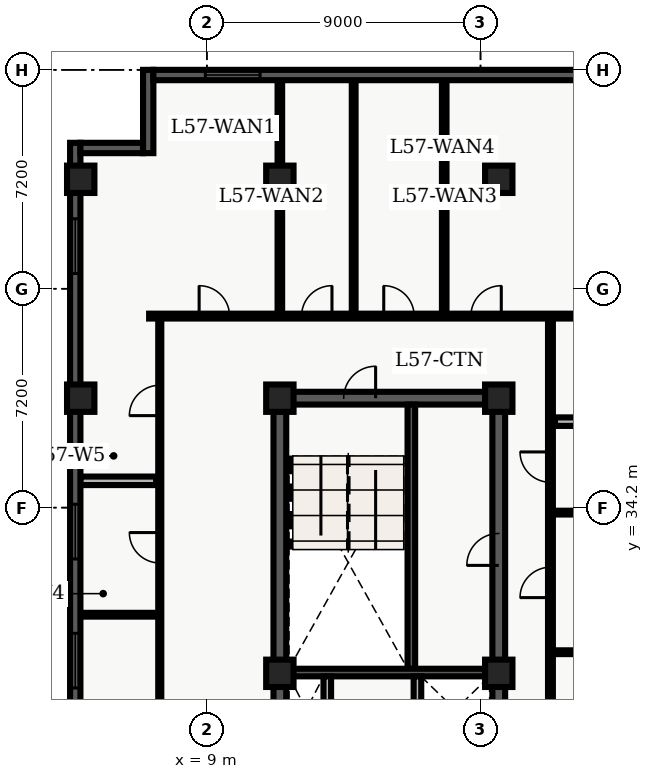
"""IFC4 building model, lengths in metres.
Left out: names, types, materials, properties, quantities, classifications, styles, units other than length and angle.
Written with IfcOpenShell. Run it as: python <this file> out.ifc"""

import sys

from ifc_helpers import new_model, entity, si_unit, converted_unit, direction, frame, origin_with_axes, origin_2d_with_axis, place, context, subcontext, project, spatial, polyline, rectangle, outline, extrude, element, fill, save


model = new_model("IFC4")
c1 = context("Model", 3, precision=1e-05, world=origin_with_axes(), true_north=direction((0.0, 1.0)))
c2 = subcontext(c1, "Body", "Model", "MODEL_VIEW")
j1 = project(units=[si_unit("LENGTHUNIT", "METRE"), converted_unit("PLANEANGLEUNIT", "DEGREE", entity("IfcPlaneAngleMeasure", 0.017), si_unit("PLANEANGLEUNIT", "RADIAN"), dimensions=[0, 0, 0, 0, 0, 0, 0])], contexts=[c1])
p1 = place(None, origin_with_axes())
s1 = spatial("IfcSite", under=j1, at=p1, CompositionType="ELEMENT")
p2 = place(p1, origin_with_axes())
s2 = spatial("IfcBuilding", under=s1, at=p2, CompositionType="ELEMENT")
p3 = place(p2, frame((0.0, 0.0, 232.5), z_axis=(0.0, 0.0, 1.0), x_axis=(1.0, 0.0, 0.0)))
s3 = spatial("IfcBuildingStorey", under=s2, at=p3, CompositionType="ELEMENT", Elevation=232.5)
p4 = place(p3, frame((11.4, 10.8, 0.0), z_axis=(0.0, 0.0, 1.0), x_axis=(0.0, 1.0, 0.0)))
e1 = element("IfcWall", 1, at=p4, inside=s3, PredefinedType="SHEAR", context=c2, shape_type="SweptSolid", body=[
    extrude(outline(polyline([(0.0, -0.21), (27.0, -0.21), (27.0, 0.21), (0.0, 0.21), (0.0, -0.21)])), origin_with_axes(), (0.0, 0.0, 1.0), 3.66),
])
p5 = place(p3, frame((11.4, 37.8, 0.0), z_axis=(0.0, 0.0, 1.0), x_axis=(1.0, 0.0, 0.0)))
e2 = element("IfcWall", 2, at=p5, inside=s3, PredefinedType="SHEAR", context=c2, shape_type="SweptSolid", body=[
    extrude(outline(polyline([(0.0, -0.21), (7.2, -0.21), (7.2, 0.21), (0.0, 0.21), (0.0, -0.21)])), origin_with_axes(), (0.0, 0.0, 1.0), 3.66),
])
p6 = place(p5, frame((2.625, 0.0, 0.0), z_axis=(0.0, 0.0, 1.0), x_axis=(1.0, 0.0, 0.0)))
e3 = element("IfcOpeningElement", 3, at=p6, cuts=e2, PredefinedType="OPENING", context=c2, shape_type="SweptSolid", body=[
    extrude(rectangle(XDim=1.05, YDim=0.44, at=origin_2d_with_axis()), origin_with_axes(), (0.0, 0.0, 1.0), 2.15),
])
p7 = place(p3, frame((18.6, 24.3, 0.0), z_axis=(0.0, 0.0, 1.0), x_axis=(0.0, 1.0, 0.0)))
e4 = element("IfcWall", 4, at=p7, inside=s3, PredefinedType="SHEAR", context=c2, shape_type="SweptSolid", body=[
    extrude(outline(polyline([(0.0, -0.21), (13.5, -0.21), (13.5, 0.21), (0.0, 0.21), (0.0, -0.21)])), origin_with_axes(), (0.0, 0.0, 1.0), 3.66),
])
p8 = place(p7, frame((8.525, 0.0, 0.0), z_axis=(0.0, 0.0, 1.0), x_axis=(1.0, 0.0, 0.0)))
e5 = element("IfcOpeningElement", 5, at=p8, cuts=e4, PredefinedType="OPENING", context=c2, shape_type="SweptSolid", body=[
    extrude(rectangle(XDim=1.05, YDim=0.44, at=origin_2d_with_axis()), origin_with_axes(), (0.0, 0.0, 1.0), 2.15),
])
p9 = place(p3, frame((15.725, 28.9, 0.0), z_axis=(0.0, 0.0, 1.0), x_axis=(0.0, 1.0, 0.0)))
e6 = element("IfcWall", 6, at=p9, inside=s3, PredefinedType="SHEAR", context=c2, shape_type="SweptSolid", body=[
    extrude(outline(polyline([(0.0, -0.125), (8.69, -0.125), (8.69, 0.125), (0.0, 0.125), (0.0, -0.125)])), origin_with_axes(), (0.0, 0.0, 1.0), 3.66),
])
p10 = place(p3, frame((11.61, 28.775, 0.0), z_axis=(0.0, 0.0, 1.0), x_axis=(1.0, 0.0, 0.0)))
e7 = element("IfcWall", 7, at=p10, inside=s3, PredefinedType="SHEAR", context=c2, shape_type="SweptSolid", body=[
    extrude(outline(polyline([(0.0, -0.125), (6.78, -0.125), (6.78, 0.125), (0.0, 0.125), (0.0, -0.125)])), origin_with_axes(), (0.0, 0.0, 1.0), 3.66),
])
for number, where, z_axis, x_axis in (
    (8, (12.96, 26.45, 0.0), (0.0, 0.0, 1.0), (0.0, 1.0, 0.0)),
    (9, (15.925, 26.45, 0.0), (0.0, 0.0, 1.0), (0.0, 1.0, 0.0)),
):
    element("IfcWall", number, at=place(p3, frame(where, z_axis=z_axis, x_axis=x_axis)), inside=s3, PredefinedType="SOLIDWALL", context=c2, shape_type="SweptSolid", body=[
        extrude(outline(polyline([(0.0, -0.125), (2.2, -0.125), (2.2, 0.125), (0.0, 0.125), (0.0, -0.125)])), origin_with_axes(), (0.0, 0.0, 1.0), 2.7),
    ])
for number, where, z_axis, x_axis in (
    (10, (11.4, 28.75, 0.0), (0.0, 0.0, 1.0), (1.0, 0.0, 0.0)),
    (11, (11.4, 37.8, 0.0), (0.0, 0.0, 1.0), (1.0, 0.0, 0.0)),
    (12, (11.4, 45.0, 0.0), (0.0, 0.0, 1.0), (1.0, 0.0, 0.0)),
    (13, (18.6, 28.75, 0.0), (0.0, 0.0, 1.0), (1.0, 0.0, 0.0)),
    (14, (18.6, 37.8, 0.0), (0.0, 0.0, 1.0), (1.0, 0.0, 0.0)),
    (15, (18.6, 45.0, 0.0), (0.0, 0.0, 1.0), (1.0, 0.0, 0.0)),
    (16, (4.85, 37.8, 0.0), (0.0, 0.0, 1.0), (1.0, 0.0, 0.0)),
    (17, (4.85, 45.0, 0.0), (0.0, 0.0, 1.0), (1.0, 0.0, 0.0)),
):
    element("IfcColumn", number, at=place(p3, frame(where, z_axis=z_axis, x_axis=x_axis)), inside=s3, PredefinedType="COLUMN", context=c2, shape_type="SweptSolid", body=[
        extrude(rectangle(XDim=0.9, YDim=0.9, at=origin_2d_with_axis()), origin_with_axes(), (0.0, 0.0, 1.0), 3.9),
    ])
p11 = place(p3, frame((7.1, 40.5, 0.0), z_axis=(0.0, 0.0, 1.0), x_axis=(1.0, 0.0, 0.0)))
e18 = element("IfcWall", 18, at=p11, inside=s3, PredefinedType="PARTITIONING", context=c2, shape_type="SweptSolid", body=[
    extrude(outline(polyline([(0.0, -0.08), (24.965, -0.08), (24.965, 0.08), (0.0, 0.08), (0.0, -0.08)])), origin_with_axes(), (0.0, 0.0, 1.0), 2.7),
])
p12 = place(p11, frame((2.145, 0.0, 0.0), z_axis=(0.0, 0.0, 1.0), x_axis=(1.0, 0.0, 0.0)))
e19 = element("IfcOpeningElement", 19, at=p12, cuts=e18, PredefinedType="OPENING", context=c2, shape_type="SweptSolid", body=[
    extrude(rectangle(XDim=1.0, YDim=0.18, at=origin_2d_with_axis()), origin_with_axes(), (0.0, 0.0, 1.0), 2.15),
])
p13 = place(p11, frame((5.514, 0.0, 0.0), z_axis=(0.0, 0.0, 1.0), x_axis=(1.0, 0.0, 0.0)))
e20 = element("IfcOpeningElement", 20, at=p13, cuts=e18, PredefinedType="OPENING", context=c2, shape_type="SweptSolid", body=[
    extrude(rectangle(XDim=1.0, YDim=0.18, at=origin_2d_with_axis()), origin_with_axes(), (0.0, 0.0, 1.0), 2.15),
])
p14 = place(p11, frame((8.217, 0.0, 0.0), z_axis=(0.0, 0.0, 1.0), x_axis=(1.0, 0.0, 0.0)))
e21 = element("IfcOpeningElement", 21, at=p14, cuts=e18, PredefinedType="OPENING", context=c2, shape_type="SweptSolid", body=[
    extrude(rectangle(XDim=1.0, YDim=0.18, at=origin_2d_with_axis()), origin_with_axes(), (0.0, 0.0, 1.0), 2.15),
])
p15 = place(p11, frame((11.083, 0.0, 0.0), z_axis=(0.0, 0.0, 1.0), x_axis=(1.0, 0.0, 0.0)))
e22 = element("IfcOpeningElement", 22, at=p15, cuts=e18, PredefinedType="OPENING", context=c2, shape_type="SweptSolid", body=[
    extrude(rectangle(XDim=1.0, YDim=0.18, at=origin_2d_with_axis()), origin_with_axes(), (0.0, 0.0, 1.0), 2.15),
])
p16 = place(p3, frame((20.3, 7.8, 0.0), z_axis=(0.0, 0.0, 1.0), x_axis=(0.0, 1.0, 0.0)))
e23 = element("IfcWall", 23, at=p16, inside=s3, PredefinedType="PARTITIONING", context=c2, shape_type="SweptSolid", body=[
    extrude(outline(polyline([(0.0, -0.08), (32.7, -0.08), (32.7, 0.08), (0.0, 0.08), (0.0, -0.08)])), origin_with_axes(), (0.0, 0.0, 1.0), 2.7),
])
p17 = place(p16, frame((14.55, 0.0, 0.0), z_axis=(0.0, 0.0, 1.0), x_axis=(1.0, 0.0, 0.0)))
e24 = element("IfcOpeningElement", 24, at=p17, cuts=e23, PredefinedType="OPENING", context=c2, shape_type="SweptSolid", body=[
    extrude(rectangle(XDim=0.9, YDim=0.18, at=origin_2d_with_axis()), origin_with_axes(), (0.0, 0.0, 1.0), 2.15),
])
p18 = place(p16, frame((18.723, 0.0, 0.0), z_axis=(0.0, 0.0, 1.0), x_axis=(1.0, 0.0, 0.0)))
e25 = element("IfcOpeningElement", 25, at=p18, cuts=e23, PredefinedType="OPENING", context=c2, shape_type="SweptSolid", body=[
    extrude(rectangle(XDim=1.0, YDim=0.18, at=origin_2d_with_axis()), origin_with_axes(), (0.0, 0.0, 1.0), 2.15),
])
p19 = place(p16, frame((23.94, 0.0, 0.0), z_axis=(0.0, 0.0, 1.0), x_axis=(1.0, 0.0, 0.0)))
e26 = element("IfcOpeningElement", 26, at=p19, cuts=e23, PredefinedType="OPENING", context=c2, shape_type="SweptSolid", body=[
    extrude(rectangle(XDim=1.0, YDim=0.18, at=origin_2d_with_axis()), origin_with_axes(), (0.0, 0.0, 1.0), 2.15),
])
p20 = place(p16, frame((27.732, 0.0, 0.0), z_axis=(0.0, 0.0, 1.0), x_axis=(1.0, 0.0, 0.0)))
e27 = element("IfcOpeningElement", 27, at=p20, cuts=e23, PredefinedType="OPENING", context=c2, shape_type="SweptSolid", body=[
    extrude(rectangle(XDim=1.0, YDim=0.18, at=origin_2d_with_axis()), origin_with_axes(), (0.0, 0.0, 1.0), 2.15),
])
p21 = place(p16, frame((5.775, 0.0, 0.0), z_axis=(0.0, 0.0, 1.0), x_axis=(1.0, 0.0, 0.0)))
e28 = element("IfcOpeningElement", 28, at=p21, cuts=e23, PredefinedType="OPENING", context=c2, shape_type="SweptSolid", body=[
    extrude(rectangle(XDim=1.05, YDim=0.18, at=origin_2d_with_axis()), origin_with_axes(), (0.0, 0.0, 1.0), 2.15),
])
p22 = place(p3, frame((7.45, 7.8, 0.0), z_axis=(0.0, 0.0, 1.0), x_axis=(0.0, 1.0, 0.0)))
e29 = element("IfcWall", 29, at=p22, inside=s3, PredefinedType="PARTITIONING", context=c2, shape_type="SweptSolid", body=[
    extrude(outline(polyline([(0.0, -0.05), (32.7, -0.05), (32.7, 0.05), (0.0, 0.05), (0.0, -0.05)])), origin_with_axes(), (0.0, 0.0, 1.0), 2.7),
])
p23 = place(p22, frame((3.195, 0.0, 0.0), z_axis=(0.0, 0.0, 1.0), x_axis=(1.0, 0.0, 0.0)))
e30 = element("IfcOpeningElement", 30, at=p23, cuts=e29, PredefinedType="OPENING", context=c2, shape_type="SweptSolid", body=[
    extrude(rectangle(XDim=1.0, YDim=0.12, at=origin_2d_with_axis()), origin_with_axes(), (0.0, 0.0, 1.0), 2.15),
])
p24 = place(p22, frame((10.044, 0.0, 0.0), z_axis=(0.0, 0.0, 1.0), x_axis=(1.0, 0.0, 0.0)))
e31 = element("IfcOpeningElement", 31, at=p24, cuts=e29, PredefinedType="OPENING", context=c2, shape_type="SweptSolid", body=[
    extrude(rectangle(XDim=1.0, YDim=0.12, at=origin_2d_with_axis()), origin_with_axes(), (0.0, 0.0, 1.0), 2.15),
])
p25 = place(p22, frame((18.352, 0.0, 0.0), z_axis=(0.0, 0.0, 1.0), x_axis=(1.0, 0.0, 0.0)))
e32 = element("IfcOpeningElement", 32, at=p25, cuts=e29, PredefinedType="OPENING", context=c2, shape_type="SweptSolid", body=[
    extrude(rectangle(XDim=1.0, YDim=0.12, at=origin_2d_with_axis()), origin_with_axes(), (0.0, 0.0, 1.0), 2.15),
])
p26 = place(p22, frame((25.079, 0.0, 0.0), z_axis=(0.0, 0.0, 1.0), x_axis=(1.0, 0.0, 0.0)))
e33 = element("IfcOpeningElement", 33, at=p26, cuts=e29, PredefinedType="OPENING", context=c2, shape_type="SweptSolid", body=[
    extrude(rectangle(XDim=1.0, YDim=0.12, at=origin_2d_with_axis()), origin_with_axes(), (0.0, 0.0, 1.0), 2.15),
])
p27 = place(p22, frame((29.926, 0.0, 0.0), z_axis=(0.0, 0.0, 1.0), x_axis=(1.0, 0.0, 0.0)))
e34 = element("IfcOpeningElement", 34, at=p27, cuts=e29, PredefinedType="OPENING", context=c2, shape_type="SweptSolid", body=[
    extrude(rectangle(XDim=1.0, YDim=0.12, at=origin_2d_with_axis()), origin_with_axes(), (0.0, 0.0, 1.0), 2.15),
])
p28 = place(p3, frame((4.835, 30.677, 0.0), z_axis=(0.0, 0.0, 1.0), x_axis=(1.0, 0.0, 0.0)))
e35 = element("IfcWall", 35, at=p28, inside=s3, PredefinedType="PARTITIONING", context=c2, shape_type="SweptSolid", body=[
    extrude(outline(polyline([(0.0, -0.062), (2.495, -0.062), (2.495, 0.062), (0.0, 0.062), (0.0, -0.062)])), origin_with_axes(), (0.0, 0.0, 1.0), 2.7),
])
p29 = place(p3, frame((4.835, 35.082, 0.0), z_axis=(0.0, 0.0, 1.0), x_axis=(1.0, 0.0, 0.0)))
e36 = element("IfcWall", 36, at=p29, inside=s3, PredefinedType="PARTITIONING", context=c2, shape_type="SweptSolid", body=[
    extrude(outline(polyline([(0.0, -0.14), (2.495, -0.14), (2.495, 0.14), (0.0, 0.14), (0.0, -0.14)])), origin_with_axes(), (0.0, 0.0, 1.0), 2.7),
])
p30 = place(p3, frame((11.4, 40.6, 0.0), z_axis=(0.0, 0.0, 1.0), x_axis=(0.0, 1.0, 0.0)))
e37 = element("IfcWall", 37, at=p30, inside=s3, PredefinedType="PARTITIONING", context=c2, shape_type="SweptSolid", body=[
    extrude(outline(polyline([(0.0, -0.075), (7.665, -0.075), (7.665, 0.075), (0.0, 0.075), (0.0, -0.075)])), origin_with_axes(), (0.0, 0.0, 1.0), 2.7),
])
p31 = place(p3, frame((13.828, 40.6, 0.0), z_axis=(0.0, 0.0, 1.0), x_axis=(0.0, 1.0, 0.0)))
e38 = element("IfcWall", 38, at=p31, inside=s3, PredefinedType="PARTITIONING", context=c2, shape_type="SweptSolid", body=[
    extrude(outline(polyline([(0.0, -0.062), (7.665, -0.062), (7.665, 0.062), (0.0, 0.062), (0.0, -0.062)])), origin_with_axes(), (0.0, 0.0, 1.0), 2.7),
])
p32 = place(p3, frame((16.806, 40.6, 0.0), z_axis=(0.0, 0.0, 1.0), x_axis=(0.0, 1.0, 0.0)))
e39 = element("IfcWall", 39, at=p32, inside=s3, PredefinedType="PARTITIONING", context=c2, shape_type="SweptSolid", body=[
    extrude(outline(polyline([(0.0, -0.075), (7.665, -0.075), (7.665, 0.075), (0.0, 0.075), (0.0, -0.075)])), origin_with_axes(), (0.0, 0.0, 1.0), 2.7),
])
for number, where, z_axis, x_axis in (
    (40, (20.45, 29.444, 0.0), (0.0, 0.0, 1.0), (1.0, 0.0, 0.0)),
    (41, (20.45, 34.036, 0.0), (0.0, 0.0, 1.0), (1.0, 0.0, 0.0)),
):
    element("IfcWall", number, at=place(p3, frame(where, z_axis=z_axis, x_axis=x_axis)), inside=s3, PredefinedType="PARTITIONING", context=c2, shape_type="SweptSolid", body=[
        extrude(outline(polyline([(0.0, -0.062), (11.615, -0.062), (11.615, 0.062), (0.0, 0.062), (0.0, -0.062)])), origin_with_axes(), (0.0, 0.0, 1.0), 2.7),
    ])
p33 = place(p3, frame((20.45, 37.028, 0.0), z_axis=(0.0, 0.0, 1.0), x_axis=(1.0, 0.0, 0.0)))
e42 = element("IfcWall", 42, at=p33, inside=s3, PredefinedType="PARTITIONING", context=c2, shape_type="SweptSolid", body=[
    extrude(outline(polyline([(0.0, -0.14), (11.615, -0.14), (11.615, 0.14), (0.0, 0.14), (0.0, -0.14)])), origin_with_axes(), (0.0, 0.0, 1.0), 2.7),
])
p34 = place(p33, frame((5.785, 0.0, 0.0), z_axis=(0.0, 0.0, 1.0), x_axis=(1.0, 0.0, 0.0)))
e43 = element("IfcOpeningElement", 43, at=p34, cuts=e42, PredefinedType="OPENING", context=c2, shape_type="SweptSolid", body=[
    extrude(rectangle(XDim=0.95, YDim=0.3, at=origin_2d_with_axis()), origin_with_axes(), (0.0, 0.0, 1.0), 2.15),
])
p35 = place(p3, frame((4.67, 2.74, 0.0), z_axis=(0.0, 0.0, 1.0), x_axis=(0.0, 1.0, 0.0)))
e44 = element("IfcWall", 44, at=p35, inside=s3, PredefinedType="SOLIDWALL", context=c2, shape_type="SweptSolid", body=[
    extrude(outline(polyline([(0.0, -0.17), (43.46, -0.17), (43.46, 0.17), (0.0, 0.17), (0.0, -0.17)])), origin_with_axes(), (0.0, 0.0, 1.0), 3.66),
])
p36 = place(p35, frame((2.948, 0.0, 0.45), z_axis=(0.0, 0.0, 1.0), x_axis=(1.0, 0.0, 0.0)))
e45 = element("IfcOpeningElement", 45, at=p36, cuts=e44, PredefinedType="OPENING", context=c2, shape_type="SweptSolid", body=[
    extrude(rectangle(XDim=1.8, YDim=0.36, at=origin_2d_with_axis()), origin_with_axes(), (0.0, 0.0, 1.0), 2.1),
])
p37 = place(p35, frame((12.789, 0.0, 0.45), z_axis=(0.0, 0.0, 1.0), x_axis=(1.0, 0.0, 0.0)))
e46 = element("IfcOpeningElement", 46, at=p37, cuts=e44, PredefinedType="OPENING", context=c2, shape_type="SweptSolid", body=[
    extrude(rectangle(XDim=1.8, YDim=0.36, at=origin_2d_with_axis()), origin_with_axes(), (0.0, 0.0, 1.0), 2.1),
])
p38 = place(p35, frame((17.034, 0.0, 0.45), z_axis=(0.0, 0.0, 1.0), x_axis=(1.0, 0.0, 0.0)))
e47 = element("IfcOpeningElement", 47, at=p38, cuts=e44, PredefinedType="OPENING", context=c2, shape_type="SweptSolid", body=[
    extrude(rectangle(XDim=1.8, YDim=0.36, at=origin_2d_with_axis()), origin_with_axes(), (0.0, 0.0, 1.0), 2.1),
])
p39 = place(p35, frame((26.426, 0.0, 0.45), z_axis=(0.0, 0.0, 1.0), x_axis=(1.0, 0.0, 0.0)))
e48 = element("IfcOpeningElement", 48, at=p39, cuts=e44, PredefinedType="OPENING", context=c2, shape_type="SweptSolid", body=[
    extrude(rectangle(XDim=1.8, YDim=0.36, at=origin_2d_with_axis()), origin_with_axes(), (0.0, 0.0, 1.0), 2.1),
])
p40 = place(p35, frame((30.671, 0.0, 0.45), z_axis=(0.0, 0.0, 1.0), x_axis=(1.0, 0.0, 0.0)))
e49 = element("IfcOpeningElement", 49, at=p40, cuts=e44, PredefinedType="OPENING", context=c2, shape_type="SweptSolid", body=[
    extrude(rectangle(XDim=1.8, YDim=0.36, at=origin_2d_with_axis()), origin_with_axes(), (0.0, 0.0, 1.0), 2.1),
])
p41 = place(p35, frame((40.062, 0.0, 0.45), z_axis=(0.0, 0.0, 1.0), x_axis=(1.0, 0.0, 0.0)))
e50 = element("IfcOpeningElement", 50, at=p41, cuts=e44, PredefinedType="OPENING", context=c2, shape_type="SweptSolid", body=[
    extrude(rectangle(XDim=1.8, YDim=0.36, at=origin_2d_with_axis()), origin_with_axes(), (0.0, 0.0, 1.0), 2.1),
])
p42 = place(p3, frame((4.84, 46.03, 0.0), z_axis=(0.0, 0.0, 1.0), x_axis=(1.0, 0.0, 0.0)))
e51 = element("IfcWall", 51, at=p42, inside=s3, PredefinedType="SOLIDWALL", context=c2, shape_type="SweptSolid", body=[
    extrude(outline(polyline([(0.0, -0.17), (2.06, -0.17), (2.06, 0.17), (0.0, 0.17), (0.0, -0.17)])), origin_with_axes(), (0.0, 0.0, 1.0), 3.66),
])
p43 = place(p3, frame((7.07, 45.86, 0.0), z_axis=(0.0, 0.0, 1.0), x_axis=(0.0, 1.0, 0.0)))
e52 = element("IfcWall", 52, at=p43, inside=s3, PredefinedType="SOLIDWALL", context=c2, shape_type="SweptSolid", body=[
    extrude(outline(polyline([(0.0, -0.17), (2.74, -0.17), (2.74, 0.17), (0.0, 0.17), (0.0, -0.17)])), origin_with_axes(), (0.0, 0.0, 1.0), 3.66),
])
p44 = place(p3, frame((7.24, 48.43, 0.0), z_axis=(0.0, 0.0, 1.0), x_axis=(1.0, 0.0, 0.0)))
e53 = element("IfcWall", 53, at=p44, inside=s3, PredefinedType="SOLIDWALL", context=c2, shape_type="SweptSolid", body=[
    extrude(outline(polyline([(0.0, -0.17), (18.36, -0.17), (18.36, 0.17), (0.0, 0.17), (0.0, -0.17)])), origin_with_axes(), (0.0, 0.0, 1.0), 3.66),
])
p45 = place(p44, frame((2.61, 0.0, 0.45), z_axis=(0.0, 0.0, 1.0), x_axis=(1.0, 0.0, 0.0)))
e54 = element("IfcOpeningElement", 54, at=p45, cuts=e53, PredefinedType="OPENING", context=c2, shape_type="SweptSolid", body=[
    extrude(rectangle(XDim=1.8, YDim=0.36, at=origin_2d_with_axis()), origin_with_axes(), (0.0, 0.0, 1.0), 2.1),
])
p46 = place(p44, frame((14.9, 0.0, 0.45), z_axis=(0.0, 0.0, 1.0), x_axis=(1.0, 0.0, 0.0)))
e55 = element("IfcOpeningElement", 55, at=p46, cuts=e53, PredefinedType="OPENING", context=c2, shape_type="SweptSolid", body=[
    extrude(rectangle(XDim=1.8, YDim=0.36, at=origin_2d_with_axis()), origin_with_axes(), (0.0, 0.0, 1.0), 2.1),
])
p47 = place(p5, frame((2.625, 0.0, 0.0), z_axis=(0.0, 0.0, 1.0), x_axis=(1.0, 0.0, 0.0)))
e56 = element("IfcDoor", 56, at=p47, inside=s3, OperationType="SINGLE_SWING_RIGHT", PredefinedType="DOOR", context=c2, shape_type="SweptSolid", body=[
    extrude(rectangle(XDim=1.05, YDim=0.09, at=origin_2d_with_axis()), origin_with_axes(), (0.0, 0.0, 1.0), 2.15),
])
fill(e3, e56)
p48 = place(p7, frame((8.525, 0.0, 0.0), z_axis=(0.0, 0.0, 1.0), x_axis=(1.0, 0.0, 0.0)))
e57 = element("IfcDoor", 57, at=p48, inside=s3, OperationType="SINGLE_SWING_LEFT", PredefinedType="DOOR", context=c2, shape_type="SweptSolid", body=[
    extrude(rectangle(XDim=1.05, YDim=0.09, at=origin_2d_with_axis()), origin_with_axes(), (0.0, 0.0, 1.0), 2.15),
])
fill(e5, e57)
p49 = place(p22, frame((25.079, 0.0, 0.0), z_axis=(0.0, 0.0, 1.0), x_axis=(1.0, 0.0, 0.0)))
e58 = element("IfcDoor", 58, at=p49, inside=s3, OperationType="SINGLE_SWING_RIGHT", PredefinedType="DOOR", context=c2, shape_type="SweptSolid", body=[
    extrude(rectangle(XDim=1.0, YDim=0.06, at=origin_2d_with_axis()), origin_with_axes(), (0.0, 0.0, 1.0), 2.15),
])
fill(e33, e58)
p50 = place(p22, frame((29.926, 0.0, 0.0), z_axis=(0.0, 0.0, 1.0), x_axis=(1.0, 0.0, 0.0)))
e59 = element("IfcDoor", 59, at=p50, inside=s3, OperationType="SINGLE_SWING_LEFT", PredefinedType="DOOR", context=c2, shape_type="SweptSolid", body=[
    extrude(rectangle(XDim=1.0, YDim=0.06, at=origin_2d_with_axis()), origin_with_axes(), (0.0, 0.0, 1.0), 2.15),
])
fill(e34, e59)
p51 = place(p11, frame((2.145, 0.0, 0.0), z_axis=(0.0, 0.0, 1.0), x_axis=(1.0, 0.0, 0.0)))
e60 = element("IfcDoor", 60, at=p51, inside=s3, OperationType="SINGLE_SWING_LEFT", PredefinedType="DOOR", context=c2, shape_type="SweptSolid", body=[
    extrude(rectangle(XDim=1.0, YDim=0.09, at=origin_2d_with_axis()), origin_with_axes(), (0.0, 0.0, 1.0), 2.15),
])
fill(e19, e60)
p52 = place(p11, frame((5.514, 0.0, 0.0), z_axis=(0.0, 0.0, 1.0), x_axis=(1.0, 0.0, 0.0)))
e61 = element("IfcDoor", 61, at=p52, inside=s3, OperationType="SINGLE_SWING_RIGHT", PredefinedType="DOOR", context=c2, shape_type="SweptSolid", body=[
    extrude(rectangle(XDim=1.0, YDim=0.09, at=origin_2d_with_axis()), origin_with_axes(), (0.0, 0.0, 1.0), 2.15),
])
fill(e20, e61)
p53 = place(p11, frame((8.217, 0.0, 0.0), z_axis=(0.0, 0.0, 1.0), x_axis=(1.0, 0.0, 0.0)))
e62 = element("IfcDoor", 62, at=p53, inside=s3, OperationType="SINGLE_SWING_LEFT", PredefinedType="DOOR", context=c2, shape_type="SweptSolid", body=[
    extrude(rectangle(XDim=1.0, YDim=0.09, at=origin_2d_with_axis()), origin_with_axes(), (0.0, 0.0, 1.0), 2.15),
])
fill(e21, e62)
p54 = place(p11, frame((11.083, 0.0, 0.0), z_axis=(0.0, 0.0, 1.0), x_axis=(1.0, 0.0, 0.0)))
e63 = element("IfcDoor", 63, at=p54, inside=s3, OperationType="SINGLE_SWING_RIGHT", PredefinedType="DOOR", context=c2, shape_type="SweptSolid", body=[
    extrude(rectangle(XDim=1.0, YDim=0.09, at=origin_2d_with_axis()), origin_with_axes(), (0.0, 0.0, 1.0), 2.15),
])
fill(e22, e63)
p55 = place(p16, frame((23.94, 0.0, 0.0), z_axis=(0.0, 0.0, 1.0), x_axis=(1.0, 0.0, 0.0)))
e64 = element("IfcDoor", 64, at=p55, inside=s3, OperationType="SINGLE_SWING_LEFT", PredefinedType="DOOR", context=c2, shape_type="SweptSolid", body=[
    extrude(rectangle(XDim=1.0, YDim=0.09, at=origin_2d_with_axis()), origin_with_axes(), (0.0, 0.0, 1.0), 2.15),
])
fill(e26, e64)
p56 = place(p16, frame((27.732, 0.0, 0.0), z_axis=(0.0, 0.0, 1.0), x_axis=(1.0, 0.0, 0.0)))
e65 = element("IfcDoor", 65, at=p56, inside=s3, OperationType="SINGLE_SWING_RIGHT", PredefinedType="DOOR", context=c2, shape_type="SweptSolid", body=[
    extrude(rectangle(XDim=1.0, YDim=0.09, at=origin_2d_with_axis()), origin_with_axes(), (0.0, 0.0, 1.0), 2.15),
])
fill(e27, e65)
p57 = place(p35, frame((26.426, 0.0, 0.45), z_axis=(0.0, 0.0, 1.0), x_axis=(1.0, 0.0, 0.0)))
e66 = element("IfcWindow", 66, at=p57, inside=s3, PredefinedType="WINDOW", context=c2, shape_type="SweptSolid", body=[
    extrude(rectangle(XDim=1.8, YDim=0.09, at=origin_2d_with_axis()), origin_with_axes(), (0.0, 0.0, 1.0), 2.1),
])
fill(e48, e66)
p58 = place(p35, frame((30.671, 0.0, 0.45), z_axis=(0.0, 0.0, 1.0), x_axis=(1.0, 0.0, 0.0)))
e67 = element("IfcWindow", 67, at=p58, inside=s3, PredefinedType="WINDOW", context=c2, shape_type="SweptSolid", body=[
    extrude(rectangle(XDim=1.8, YDim=0.09, at=origin_2d_with_axis()), origin_with_axes(), (0.0, 0.0, 1.0), 2.1),
])
fill(e49, e67)
p59 = place(p35, frame((40.062, 0.0, 0.45), z_axis=(0.0, 0.0, 1.0), x_axis=(1.0, 0.0, 0.0)))
e68 = element("IfcWindow", 68, at=p59, inside=s3, PredefinedType="WINDOW", context=c2, shape_type="SweptSolid", body=[
    extrude(rectangle(XDim=1.8, YDim=0.09, at=origin_2d_with_axis()), origin_with_axes(), (0.0, 0.0, 1.0), 2.1),
])
fill(e50, e68)
p60 = place(p44, frame((2.61, 0.0, 0.45), z_axis=(0.0, 0.0, 1.0), x_axis=(1.0, 0.0, 0.0)))
e69 = element("IfcWindow", 69, at=p60, inside=s3, PredefinedType="WINDOW", context=c2, shape_type="SweptSolid", body=[
    extrude(rectangle(XDim=1.8, YDim=0.09, at=origin_2d_with_axis()), origin_with_axes(), (0.0, 0.0, 1.0), 2.1),
])
fill(e54, e69)
save(model, sys.argv[1])
